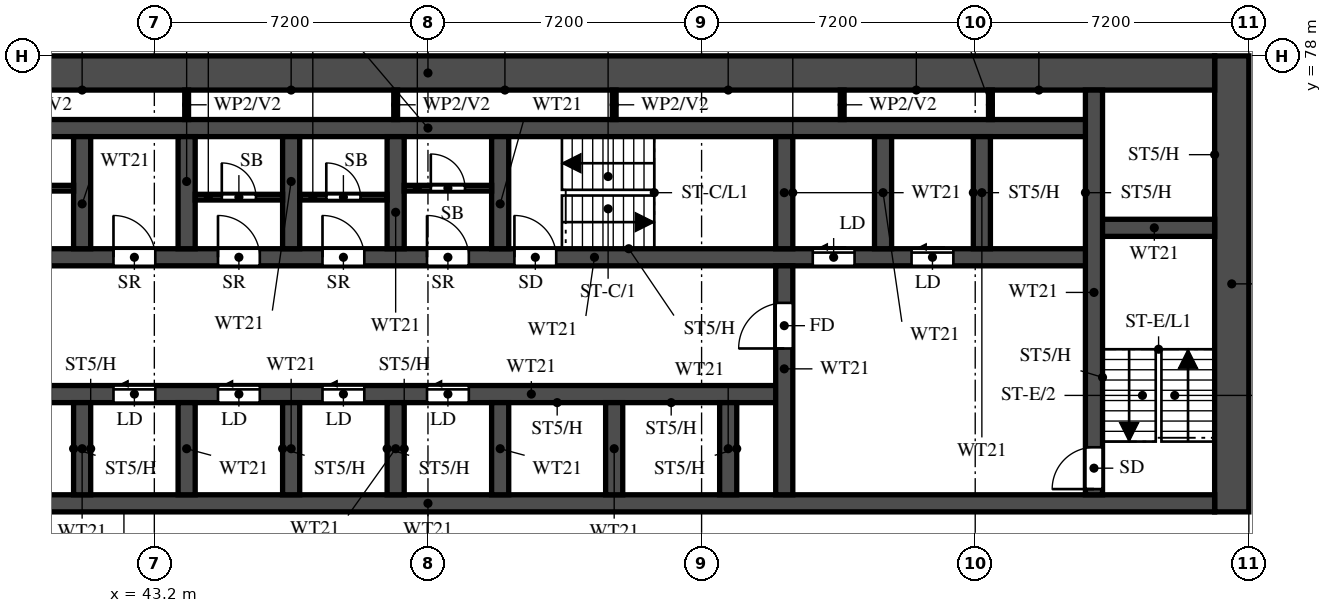
"""IFC4 building model, lengths in metres.
Left out: names, types, materials, properties, quantities, classifications, styles, units other than length and angle.
Written with IfcOpenShell. Run it as: python <this file> out.ifc"""

import sys

from ifc_helpers import new_model, si_unit, direction, frame, frame_2d, origin, place, context, subcontext, project, spatial, rectangle, extrude, element, fill, save


model = new_model("IFC4")
c1 = context("Model", 3, precision=1e-05, world=origin(), true_north=direction((0.0, 1.0)))
c2 = subcontext(c1, "Body", "Model", "MODEL_VIEW")
j1 = project(units=[si_unit("LENGTHUNIT", "METRE"), si_unit("PLANEANGLEUNIT", "RADIAN")], contexts=[c1])
p1 = place(None, origin())
s1 = spatial("IfcSite", under=j1, at=p1, CompositionType="ELEMENT")
p2 = place(p1, origin())
s2 = spatial("IfcBuilding", under=s1, at=p2, CompositionType="ELEMENT")
p3 = place(p2, frame((0.0, 0.0, 27.0)))
s3 = spatial("IfcBuildingStorey", under=s2, at=p3, CompositionType="ELEMENT", Elevation=27.0)
p4 = place(p3, frame((71.55, 66.0, 0.0), z_axis=(0.0, 0.0, 1.0), x_axis=(0.0, 1.0, 0.0)))
e1 = element("IfcWall", 1, at=p4, inside=s3, PredefinedType="SHEAR", context=c2, shape_type="SweptSolid", body=[
    extrude(rectangle(XDim=12.0, YDim=0.9, at=frame_2d((6.0, 0.0))), origin(), (0.0, 0.0, 1.0), 3.18),
])
p5 = place(p3, frame((29.7, 77.55, 0.0), z_axis=(0.0, 0.0, 1.0), x_axis=(1.0, 0.0, 0.0)))
e2 = element("IfcWall", 2, at=p5, inside=s3, PredefinedType="SHEAR", context=c2, shape_type="SweptSolid", body=[
    extrude(rectangle(XDim=41.4, YDim=0.9, at=frame_2d((20.7, 0.0))), origin(), (0.0, 0.0, 1.0), 3.18),
])
p6 = place(p3, frame((29.7, 66.225, 0.0), z_axis=(0.0, 0.0, 1.0), x_axis=(1.0, 0.0, 0.0)))
e3 = element("IfcWall", 3, at=p6, inside=s3, PredefinedType="SHEAR", context=c2, shape_type="SweptSolid", body=[
    extrude(rectangle(XDim=41.4, YDim=0.45, at=frame_2d((20.7, 0.0))), origin(), (0.0, 0.0, 1.0), 3.18),
])
p7 = place(p6, frame((0.925, 0.0, 0.0)))
e4 = element("IfcOpeningElement", 4, at=p7, cuts=e3, PredefinedType="OPENING", context=c2, shape_type="SweptSolid", body=[
    extrude(rectangle(XDim=1.1, YDim=2.1, at=frame_2d((0.55, 1.05))), frame((0.0, 0.235, 0.0), z_axis=(0.0, -1.0, 0.0), x_axis=(1.0, 0.0, 0.0)), (0.0, 0.0, 1.0), 0.47),
])
p8 = place(p6, frame((3.738, 0.0, 0.0)))
e5 = element("IfcOpeningElement", 5, at=p8, cuts=e3, PredefinedType="OPENING", context=c2, shape_type="SweptSolid", body=[
    extrude(rectangle(XDim=1.8, YDim=2.1, at=frame_2d((0.9, 1.05))), frame((0.0, 0.235, 0.0), z_axis=(0.0, -1.0, 0.0), x_axis=(1.0, 0.0, 0.0)), (0.0, 0.0, 1.0), 0.47),
])
p9 = place(p3, frame((35.575, 69.1, 0.0), z_axis=(0.0, 0.0, 1.0), x_axis=(1.0, 0.0, 0.0)))
e6 = element("IfcWall", 6, at=p9, inside=s3, PredefinedType="SHEAR", context=c2, shape_type="SweptSolid", body=[
    extrude(rectangle(XDim=24.2, YDim=0.45, at=frame_2d((12.1, 0.0))), origin(), (0.0, 0.0, 1.0), 3.18),
])
p10 = place(p9, frame((1.05, 0.0, 0.0)))
e7 = element("IfcOpeningElement", 7, at=p10, cuts=e6, PredefinedType="OPENING", context=c2, shape_type="SweptSolid", body=[
    extrude(rectangle(XDim=1.1, YDim=2.1, at=frame_2d((0.55, 1.05))), frame((0.0, 0.235, 0.0), z_axis=(0.0, -1.0, 0.0), x_axis=(1.0, 0.0, 0.0)), (0.0, 0.0, 1.0), 0.47),
])
p11 = place(p9, frame((3.8, 0.0, 0.0)))
e8 = element("IfcOpeningElement", 8, at=p11, cuts=e6, PredefinedType="OPENING", context=c2, shape_type="SweptSolid", body=[
    extrude(rectangle(XDim=1.1, YDim=2.1, at=frame_2d((0.55, 1.05))), frame((0.0, 0.235, 0.0), z_axis=(0.0, -1.0, 0.0), x_axis=(1.0, 0.0, 0.0)), (0.0, 0.0, 1.0), 0.47),
])
p12 = place(p9, frame((6.55, 0.0, 0.0)))
e9 = element("IfcOpeningElement", 9, at=p12, cuts=e6, PredefinedType="OPENING", context=c2, shape_type="SweptSolid", body=[
    extrude(rectangle(XDim=1.1, YDim=2.1, at=frame_2d((0.55, 1.05))), frame((0.0, 0.235, 0.0), z_axis=(0.0, -1.0, 0.0), x_axis=(1.0, 0.0, 0.0)), (0.0, 0.0, 1.0), 0.47),
])
p13 = place(p9, frame((9.3, 0.0, 0.0)))
e10 = element("IfcOpeningElement", 10, at=p13, cuts=e6, PredefinedType="OPENING", context=c2, shape_type="SweptSolid", body=[
    extrude(rectangle(XDim=1.1, YDim=2.1, at=frame_2d((0.55, 1.05))), frame((0.0, 0.235, 0.0), z_axis=(0.0, -1.0, 0.0), x_axis=(1.0, 0.0, 0.0)), (0.0, 0.0, 1.0), 0.47),
])
p14 = place(p9, frame((12.05, 0.0, 0.0)))
e11 = element("IfcOpeningElement", 11, at=p14, cuts=e6, PredefinedType="OPENING", context=c2, shape_type="SweptSolid", body=[
    extrude(rectangle(XDim=1.1, YDim=2.1, at=frame_2d((0.55, 1.05))), frame((0.0, 0.235, 0.0), z_axis=(0.0, -1.0, 0.0), x_axis=(1.0, 0.0, 0.0)), (0.0, 0.0, 1.0), 0.47),
])
p15 = place(p9, frame((14.8, 0.0, 0.0)))
e12 = element("IfcOpeningElement", 12, at=p15, cuts=e6, PredefinedType="OPENING", context=c2, shape_type="SweptSolid", body=[
    extrude(rectangle(XDim=1.1, YDim=2.1, at=frame_2d((0.55, 1.05))), frame((0.0, 0.235, 0.0), z_axis=(0.0, -1.0, 0.0), x_axis=(1.0, 0.0, 0.0)), (0.0, 0.0, 1.0), 0.47),
])
p16 = place(p3, frame((32.875, 72.7, 0.0), z_axis=(0.0, 0.0, 1.0), x_axis=(1.0, 0.0, 0.0)))
e13 = element("IfcWall", 13, at=p16, inside=s3, PredefinedType="SHEAR", context=c2, shape_type="SweptSolid", body=[
    extrude(rectangle(XDim=35.05, YDim=0.45, at=frame_2d((17.525, 0.0))), origin(), (0.0, 0.0, 1.0), 3.18),
])
p17 = place(p16, frame((19.8, 0.0, 0.0)))
e14 = element("IfcOpeningElement", 14, at=p17, cuts=e13, PredefinedType="OPENING", context=c2, shape_type="SweptSolid", body=[
    extrude(rectangle(XDim=1.1, YDim=2.1, at=frame_2d((0.55, 1.05))), frame((0.0, 0.235, 0.0), z_axis=(0.0, -1.0, 0.0), x_axis=(1.0, 0.0, 0.0)), (0.0, 0.0, 1.0), 0.47),
])
p18 = place(p16, frame((27.65, 0.0, 0.0)))
e15 = element("IfcOpeningElement", 15, at=p18, cuts=e13, PredefinedType="OPENING", context=c2, shape_type="SweptSolid", body=[
    extrude(rectangle(XDim=1.1, YDim=2.1, at=frame_2d((0.55, 1.05))), frame((0.0, 0.235, 0.0), z_axis=(0.0, -1.0, 0.0), x_axis=(1.0, 0.0, 0.0)), (0.0, 0.0, 1.0), 0.47),
])
p19 = place(p16, frame((30.25, 0.0, 0.0)))
e16 = element("IfcOpeningElement", 16, at=p19, cuts=e13, PredefinedType="OPENING", context=c2, shape_type="SweptSolid", body=[
    extrude(rectangle(XDim=1.1, YDim=2.1, at=frame_2d((0.55, 1.05))), frame((0.0, 0.235, 0.0), z_axis=(0.0, -1.0, 0.0), x_axis=(1.0, 0.0, 0.0)), (0.0, 0.0, 1.0), 0.47),
])
p20 = place(p16, frame((3.75, 0.0, 0.0)))
e17 = element("IfcOpeningElement", 17, at=p20, cuts=e13, PredefinedType="OPENING", context=c2, shape_type="SweptSolid", body=[
    extrude(rectangle(XDim=1.1, YDim=2.1, at=frame_2d((0.55, 1.05))), frame((0.0, 0.235, 0.0), z_axis=(0.0, -1.0, 0.0), x_axis=(1.0, 0.0, 0.0)), (0.0, 0.0, 1.0), 0.47),
])
p21 = place(p16, frame((6.5, 0.0, 0.0)))
e18 = element("IfcOpeningElement", 18, at=p21, cuts=e13, PredefinedType="OPENING", context=c2, shape_type="SweptSolid", body=[
    extrude(rectangle(XDim=1.1, YDim=2.1, at=frame_2d((0.55, 1.05))), frame((0.0, 0.235, 0.0), z_axis=(0.0, -1.0, 0.0), x_axis=(1.0, 0.0, 0.0)), (0.0, 0.0, 1.0), 0.47),
])
p22 = place(p16, frame((9.25, 0.0, 0.0)))
e19 = element("IfcOpeningElement", 19, at=p22, cuts=e13, PredefinedType="OPENING", context=c2, shape_type="SweptSolid", body=[
    extrude(rectangle(XDim=1.1, YDim=2.1, at=frame_2d((0.55, 1.05))), frame((0.0, 0.235, 0.0), z_axis=(0.0, -1.0, 0.0), x_axis=(1.0, 0.0, 0.0)), (0.0, 0.0, 1.0), 0.47),
])
p23 = place(p16, frame((12.0, 0.0, 0.0)))
e20 = element("IfcOpeningElement", 20, at=p23, cuts=e13, PredefinedType="OPENING", context=c2, shape_type="SweptSolid", body=[
    extrude(rectangle(XDim=1.1, YDim=2.1, at=frame_2d((0.55, 1.05))), frame((0.0, 0.235, 0.0), z_axis=(0.0, -1.0, 0.0), x_axis=(1.0, 0.0, 0.0)), (0.0, 0.0, 1.0), 0.47),
])
p24 = place(p16, frame((14.75, 0.0, 0.0)))
e21 = element("IfcOpeningElement", 21, at=p24, cuts=e13, PredefinedType="OPENING", context=c2, shape_type="SweptSolid", body=[
    extrude(rectangle(XDim=1.1, YDim=2.1, at=frame_2d((0.55, 1.05))), frame((0.0, 0.235, 0.0), z_axis=(0.0, -1.0, 0.0), x_axis=(1.0, 0.0, 0.0)), (0.0, 0.0, 1.0), 0.47),
])
p25 = place(p16, frame((17.5, 0.0, 0.0)))
e22 = element("IfcOpeningElement", 22, at=p25, cuts=e13, PredefinedType="OPENING", context=c2, shape_type="SweptSolid", body=[
    extrude(rectangle(XDim=1.1, YDim=2.1, at=frame_2d((0.55, 1.05))), frame((0.0, 0.235, 0.0), z_axis=(0.0, -1.0, 0.0), x_axis=(1.0, 0.0, 0.0)), (0.0, 0.0, 1.0), 0.47),
])
p26 = place(p16, frame((0.913, 0.0, 0.0)))
e23 = element("IfcOpeningElement", 23, at=p26, cuts=e13, PredefinedType="OPENING", context=c2, shape_type="SweptSolid", body=[
    extrude(rectangle(XDim=1.1, YDim=2.1, at=frame_2d((0.55, 1.05))), frame((0.0, 0.235, 0.0), z_axis=(0.0, -1.0, 0.0), x_axis=(1.0, 0.0, 0.0)), (0.0, 0.0, 1.0), 0.47),
])
p27 = place(p3, frame((32.875, 76.1, 0.0), z_axis=(0.0, 0.0, 1.0), x_axis=(1.0, 0.0, 0.0)))
e24 = element("IfcWall", 24, at=p27, inside=s3, PredefinedType="SHEAR", context=c2, shape_type="SweptSolid", body=[
    extrude(rectangle(XDim=35.05, YDim=0.45, at=frame_2d((17.525, 0.0))), origin(), (0.0, 0.0, 1.0), 3.18),
])
p28 = place(p3, frame((67.925, 73.475, 0.0), z_axis=(0.0, 0.0, 1.0), x_axis=(1.0, 0.0, 0.0)))
e25 = element("IfcWall", 25, at=p28, inside=s3, PredefinedType="SHEAR", context=c2, shape_type="SweptSolid", body=[
    extrude(rectangle(XDim=3.175, YDim=0.45, at=frame_2d((1.587, 0.0))), origin(), (0.0, 0.0, 1.0), 3.18),
])
p29 = place(p3, frame((67.925, 66.45, 0.0), z_axis=(0.0, 0.0, 1.0), x_axis=(0.0, 1.0, 0.0)))
e26 = element("IfcWall", 26, at=p29, inside=s3, PredefinedType="SHEAR", context=c2, shape_type="SweptSolid", body=[
    extrude(rectangle(XDim=10.65, YDim=0.45, at=frame_2d((5.325, 0.0))), origin(), (0.0, 0.0, 1.0), 3.18),
])
p30 = place(p29, frame((0.15, 0.0, 0.0)))
e27 = element("IfcOpeningElement", 27, at=p30, cuts=e26, PredefinedType="OPENING", context=c2, shape_type="SweptSolid", body=[
    extrude(rectangle(XDim=1.1, YDim=2.1, at=frame_2d((0.55, 1.05))), frame((0.0, 0.235, 0.0), z_axis=(0.0, -1.0, 0.0), x_axis=(1.0, 0.0, 0.0)), (0.0, 0.0, 1.0), 0.47),
])
p31 = place(p3, frame((59.775, 66.45, 0.0), z_axis=(0.0, 0.0, 1.0), x_axis=(0.0, 1.0, 0.0)))
e28 = element("IfcWall", 28, at=p31, inside=s3, PredefinedType="SHEAR", context=c2, shape_type="SweptSolid", body=[
    extrude(rectangle(XDim=6.025, YDim=0.45, at=frame_2d((3.013, 0.0))), origin(), (0.0, 0.0, 1.0), 3.18),
])
p32 = place(p31, frame((3.85, 0.0, 0.0)))
e29 = element("IfcOpeningElement", 29, at=p32, cuts=e28, PredefinedType="OPENING", context=c2, shape_type="SweptSolid", body=[
    extrude(rectangle(XDim=1.2, YDim=2.1, at=frame_2d((0.6, 1.05))), frame((0.0, 0.235, 0.0), z_axis=(0.0, -1.0, 0.0), x_axis=(1.0, 0.0, 0.0)), (0.0, 0.0, 1.0), 0.47),
])
p33 = place(p3, frame((59.775, 72.925, 0.0), z_axis=(0.0, 0.0, 1.0), x_axis=(0.0, 1.0, 0.0)))
e30 = element("IfcWall", 30, at=p33, inside=s3, PredefinedType="SHEAR", context=c2, shape_type="SweptSolid", body=[
    extrude(rectangle(XDim=2.95, YDim=0.45, at=frame_2d((1.475, 0.0))), origin(), (0.0, 0.0, 1.0), 3.18),
])
for number, where, z_axis, x_axis in (
    (31, (41.3, 66.45, 0.0), (0.0, 0.0, 1.0), (0.0, 1.0, 0.0)),
    (32, (44.05, 66.45, 0.0), (0.0, 0.0, 1.0), (0.0, 1.0, 0.0)),
    (33, (46.8, 66.45, 0.0), (0.0, 0.0, 1.0), (0.0, 1.0, 0.0)),
    (34, (49.55, 66.45, 0.0), (0.0, 0.0, 1.0), (0.0, 1.0, 0.0)),
    (35, (52.3, 66.45, 0.0), (0.0, 0.0, 1.0), (0.0, 1.0, 0.0)),
    (36, (55.3, 66.45, 0.0), (0.0, 0.0, 1.0), (0.0, 1.0, 0.0)),
    (37, (58.3, 66.45, 0.0), (0.0, 0.0, 1.0), (0.0, 1.0, 0.0)),
):
    element("IfcWall", number, at=place(p3, frame(where, z_axis=z_axis, x_axis=x_axis)), inside=s3, PredefinedType="SHEAR", context=c2, shape_type="SweptSolid", body=[
        extrude(rectangle(XDim=2.425, YDim=0.45, at=frame_2d((1.212, 0.0))), origin(), (0.0, 0.0, 1.0), 3.18),
    ])
for number, where, z_axis, x_axis in (
    (38, (41.3, 72.925, 0.0), (0.0, 0.0, 1.0), (0.0, 1.0, 0.0)),
    (39, (44.05, 72.925, 0.0), (0.0, 0.0, 1.0), (0.0, 1.0, 0.0)),
    (40, (46.8, 72.925, 0.0), (0.0, 0.0, 1.0), (0.0, 1.0, 0.0)),
    (41, (49.55, 72.925, 0.0), (0.0, 0.0, 1.0), (0.0, 1.0, 0.0)),
    (42, (52.3, 72.925, 0.0), (0.0, 0.0, 1.0), (0.0, 1.0, 0.0)),
    (43, (62.375, 72.925, 0.0), (0.0, 0.0, 1.0), (0.0, 1.0, 0.0)),
    (44, (64.975, 72.925, 0.0), (0.0, 0.0, 1.0), (0.0, 1.0, 0.0)),
):
    element("IfcWall", number, at=place(p3, frame(where, z_axis=z_axis, x_axis=x_axis)), inside=s3, PredefinedType="SHEAR", context=c2, shape_type="SweptSolid", body=[
        extrude(rectangle(XDim=2.95, YDim=0.45, at=frame_2d((1.475, 0.0))), origin(), (0.0, 0.0, 1.0), 3.18),
    ])
p34 = place(p3, frame((38.775, 74.518, 0.0), z_axis=(0.0, 0.0, 1.0), x_axis=(1.0, 0.0, 0.0)))
e45 = element("IfcWall", 45, at=p34, inside=s3, PredefinedType="PARTITIONING", context=c2, shape_type="SweptSolid", body=[
    extrude(rectangle(XDim=2.3, YDim=0.15, at=frame_2d((1.15, 0.0))), origin(), (0.0, 0.0, 1.0), 3.18),
])
p35 = place(p34, frame((0.7, 0.0, 0.0)))
e46 = element("IfcOpeningElement", 46, at=p35, cuts=e45, PredefinedType="OPENING", context=c2, shape_type="SweptSolid", body=[
    extrude(rectangle(XDim=0.9, YDim=2.1, at=frame_2d((0.45, 1.05))), frame((0.0, 0.085, 0.0), z_axis=(0.0, -1.0, 0.0), x_axis=(1.0, 0.0, 0.0)), (0.0, 0.0, 1.0), 0.17),
])
p36 = place(p3, frame((44.275, 74.282, 0.0), z_axis=(0.0, 0.0, 1.0), x_axis=(1.0, 0.0, 0.0)))
e47 = element("IfcWall", 47, at=p36, inside=s3, PredefinedType="PARTITIONING", context=c2, shape_type="SweptSolid", body=[
    extrude(rectangle(XDim=2.3, YDim=0.15, at=frame_2d((1.15, 0.0))), origin(), (0.0, 0.0, 1.0), 3.18),
])
p37 = place(p36, frame((0.7, 0.0, 0.0)))
e48 = element("IfcOpeningElement", 48, at=p37, cuts=e47, PredefinedType="OPENING", context=c2, shape_type="SweptSolid", body=[
    extrude(rectangle(XDim=0.9, YDim=2.1, at=frame_2d((0.45, 1.05))), frame((0.0, 0.085, 0.0), z_axis=(0.0, -1.0, 0.0), x_axis=(1.0, 0.0, 0.0)), (0.0, 0.0, 1.0), 0.17),
])
p38 = place(p3, frame((47.025, 74.282, 0.0), z_axis=(0.0, 0.0, 1.0), x_axis=(1.0, 0.0, 0.0)))
e49 = element("IfcWall", 49, at=p38, inside=s3, PredefinedType="PARTITIONING", context=c2, shape_type="SweptSolid", body=[
    extrude(rectangle(XDim=2.3, YDim=0.15, at=frame_2d((1.15, 0.0))), origin(), (0.0, 0.0, 1.0), 3.18),
])
p39 = place(p38, frame((0.7, 0.0, 0.0)))
e50 = element("IfcOpeningElement", 50, at=p39, cuts=e49, PredefinedType="OPENING", context=c2, shape_type="SweptSolid", body=[
    extrude(rectangle(XDim=0.9, YDim=2.1, at=frame_2d((0.45, 1.05))), frame((0.0, 0.085, 0.0), z_axis=(0.0, -1.0, 0.0), x_axis=(1.0, 0.0, 0.0)), (0.0, 0.0, 1.0), 0.17),
])
p40 = place(p3, frame((49.775, 74.518, 0.0), z_axis=(0.0, 0.0, 1.0), x_axis=(1.0, 0.0, 0.0)))
e51 = element("IfcWall", 51, at=p40, inside=s3, PredefinedType="PARTITIONING", context=c2, shape_type="SweptSolid", body=[
    extrude(rectangle(XDim=2.3, YDim=0.15, at=frame_2d((1.15, 0.0))), origin(), (0.0, 0.0, 1.0), 3.18),
])
p41 = place(p40, frame((0.7, 0.0, 0.0)))
e52 = element("IfcOpeningElement", 52, at=p41, cuts=e51, PredefinedType="OPENING", context=c2, shape_type="SweptSolid", body=[
    extrude(rectangle(XDim=0.9, YDim=2.1, at=frame_2d((0.45, 1.05))), frame((0.0, 0.085, 0.0), z_axis=(0.0, -1.0, 0.0), x_axis=(1.0, 0.0, 0.0)), (0.0, 0.0, 1.0), 0.17),
])
for number, where, z_axis, x_axis in (
    (53, (44.05, 76.325, 0.0), (0.0, 0.0, 1.0), (0.0, 1.0, 0.0)),
    (54, (49.55, 76.325, 0.0), (0.0, 0.0, 1.0), (0.0, 1.0, 0.0)),
    (55, (55.3, 76.325, 0.0), (0.0, 0.0, 1.0), (0.0, 1.0, 0.0)),
    (56, (61.3, 76.325, 0.0), (0.0, 0.0, 1.0), (0.0, 1.0, 0.0)),
    (57, (65.2, 76.325, 0.0), (0.0, 0.0, 1.0), (0.0, 1.0, 0.0)),
):
    element("IfcWall", number, at=place(p3, frame(where, z_axis=z_axis, x_axis=x_axis)), inside=s3, PredefinedType="PARTITIONING", context=c2, shape_type="SweptSolid", body=[
        extrude(rectangle(XDim=0.775, YDim=0.1, at=frame_2d((0.388, 0.0))), origin(), (0.0, 0.0, 1.0), 3.18),
    ])
p42 = place(p17, origin())
e58 = element("IfcDoor", 58, at=p42, inside=s3, OperationType="SINGLE_SWING_LEFT", PredefinedType="DOOR", context=c2, shape_type="SweptSolid", body=[
    extrude(rectangle(XDim=1.1, YDim=2.1, at=frame_2d((0.55, 1.05))), frame((0.0, 0.025, 0.0), z_axis=(0.0, -1.0, 0.0), x_axis=(1.0, 0.0, 0.0)), (0.0, 0.0, 1.0), 0.05),
])
fill(e14, e58)
p43 = place(p30, origin())
e59 = element("IfcDoor", 59, at=p43, inside=s3, OperationType="SINGLE_SWING_LEFT", PredefinedType="DOOR", context=c2, shape_type="SweptSolid", body=[
    extrude(rectangle(XDim=1.1, YDim=2.1, at=frame_2d((0.55, 1.05))), frame((0.0, 0.025, 0.0), z_axis=(0.0, -1.0, 0.0), x_axis=(1.0, 0.0, 0.0)), (0.0, 0.0, 1.0), 0.05),
])
fill(e27, e59)
p44 = place(p32, origin())
e60 = element("IfcDoor", 60, at=p44, inside=s3, OperationType="SINGLE_SWING_RIGHT", PredefinedType="DOOR", context=c2, shape_type="SweptSolid", body=[
    extrude(rectangle(XDim=1.2, YDim=2.1, at=frame_2d((0.6, 1.05))), frame((0.0, 0.025, 0.0), z_axis=(0.0, -1.0, 0.0), x_axis=(1.0, 0.0, 0.0)), (0.0, 0.0, 1.0), 0.05),
])
fill(e29, e60)
p45 = place(p18, origin())
e61 = element("IfcDoor", 61, at=p45, inside=s3, OperationType="SLIDING_TO_LEFT", PredefinedType="DOOR", context=c2, shape_type="SweptSolid", body=[
    extrude(rectangle(XDim=1.1, YDim=2.1, at=frame_2d((0.55, 1.05))), frame((0.0, 0.025, 0.0), z_axis=(0.0, -1.0, 0.0), x_axis=(1.0, 0.0, 0.0)), (0.0, 0.0, 1.0), 0.05),
])
fill(e15, e61)
p46 = place(p19, origin())
e62 = element("IfcDoor", 62, at=p46, inside=s3, OperationType="SLIDING_TO_LEFT", PredefinedType="DOOR", context=c2, shape_type="SweptSolid", body=[
    extrude(rectangle(XDim=1.1, YDim=2.1, at=frame_2d((0.55, 1.05))), frame((0.0, 0.025, 0.0), z_axis=(0.0, -1.0, 0.0), x_axis=(1.0, 0.0, 0.0)), (0.0, 0.0, 1.0), 0.05),
])
fill(e16, e62)
p47 = place(p12, origin())
e63 = element("IfcDoor", 63, at=p47, inside=s3, OperationType="SLIDING_TO_LEFT", PredefinedType="DOOR", context=c2, shape_type="SweptSolid", body=[
    extrude(rectangle(XDim=1.1, YDim=2.1, at=frame_2d((0.55, 1.05))), frame((0.0, 0.025, 0.0), z_axis=(0.0, -1.0, 0.0), x_axis=(1.0, 0.0, 0.0)), (0.0, 0.0, 1.0), 0.05),
])
fill(e9, e63)
p48 = place(p13, origin())
e64 = element("IfcDoor", 64, at=p48, inside=s3, OperationType="SLIDING_TO_LEFT", PredefinedType="DOOR", context=c2, shape_type="SweptSolid", body=[
    extrude(rectangle(XDim=1.1, YDim=2.1, at=frame_2d((0.55, 1.05))), frame((0.0, 0.025, 0.0), z_axis=(0.0, -1.0, 0.0), x_axis=(1.0, 0.0, 0.0)), (0.0, 0.0, 1.0), 0.05),
])
fill(e10, e64)
p49 = place(p14, origin())
e65 = element("IfcDoor", 65, at=p49, inside=s3, OperationType="SLIDING_TO_LEFT", PredefinedType="DOOR", context=c2, shape_type="SweptSolid", body=[
    extrude(rectangle(XDim=1.1, YDim=2.1, at=frame_2d((0.55, 1.05))), frame((0.0, 0.025, 0.0), z_axis=(0.0, -1.0, 0.0), x_axis=(1.0, 0.0, 0.0)), (0.0, 0.0, 1.0), 0.05),
])
fill(e11, e65)
p50 = place(p15, origin())
e66 = element("IfcDoor", 66, at=p50, inside=s3, OperationType="SLIDING_TO_LEFT", PredefinedType="DOOR", context=c2, shape_type="SweptSolid", body=[
    extrude(rectangle(XDim=1.1, YDim=2.1, at=frame_2d((0.55, 1.05))), frame((0.0, 0.025, 0.0), z_axis=(0.0, -1.0, 0.0), x_axis=(1.0, 0.0, 0.0)), (0.0, 0.0, 1.0), 0.05),
])
fill(e12, e66)
p51 = place(p22, origin())
e67 = element("IfcDoor", 67, at=p51, inside=s3, OperationType="SINGLE_SWING_LEFT", PredefinedType="DOOR", context=c2, shape_type="SweptSolid", body=[
    extrude(rectangle(XDim=1.1, YDim=2.1, at=frame_2d((0.55, 1.05))), frame((0.0, 0.025, 0.0), z_axis=(0.0, -1.0, 0.0), x_axis=(1.0, 0.0, 0.0)), (0.0, 0.0, 1.0), 0.05),
])
fill(e19, e67)
p52 = place(p23, origin())
e68 = element("IfcDoor", 68, at=p52, inside=s3, OperationType="SINGLE_SWING_LEFT", PredefinedType="DOOR", context=c2, shape_type="SweptSolid", body=[
    extrude(rectangle(XDim=1.1, YDim=2.1, at=frame_2d((0.55, 1.05))), frame((0.0, 0.025, 0.0), z_axis=(0.0, -1.0, 0.0), x_axis=(1.0, 0.0, 0.0)), (0.0, 0.0, 1.0), 0.05),
])
fill(e20, e68)
p53 = place(p37, origin())
e69 = element("IfcDoor", 69, at=p53, inside=s3, OperationType="SINGLE_SWING_RIGHT", PredefinedType="DOOR", context=c2, shape_type="SweptSolid", body=[
    extrude(rectangle(XDim=0.9, YDim=2.1, at=frame_2d((0.45, 1.05))), frame((0.0, 0.025, 0.0), z_axis=(0.0, -1.0, 0.0), x_axis=(1.0, 0.0, 0.0)), (0.0, 0.0, 1.0), 0.05),
])
fill(e48, e69)
p54 = place(p24, origin())
e70 = element("IfcDoor", 70, at=p54, inside=s3, OperationType="SINGLE_SWING_LEFT", PredefinedType="DOOR", context=c2, shape_type="SweptSolid", body=[
    extrude(rectangle(XDim=1.1, YDim=2.1, at=frame_2d((0.55, 1.05))), frame((0.0, 0.025, 0.0), z_axis=(0.0, -1.0, 0.0), x_axis=(1.0, 0.0, 0.0)), (0.0, 0.0, 1.0), 0.05),
])
fill(e21, e70)
p55 = place(p39, origin())
e71 = element("IfcDoor", 71, at=p55, inside=s3, OperationType="SINGLE_SWING_LEFT", PredefinedType="DOOR", context=c2, shape_type="SweptSolid", body=[
    extrude(rectangle(XDim=0.9, YDim=2.1, at=frame_2d((0.45, 1.05))), frame((0.0, 0.025, 0.0), z_axis=(0.0, -1.0, 0.0), x_axis=(1.0, 0.0, 0.0)), (0.0, 0.0, 1.0), 0.05),
])
fill(e50, e71)
p56 = place(p25, origin())
e72 = element("IfcDoor", 72, at=p56, inside=s3, OperationType="SINGLE_SWING_LEFT", PredefinedType="DOOR", context=c2, shape_type="SweptSolid", body=[
    extrude(rectangle(XDim=1.1, YDim=2.1, at=frame_2d((0.55, 1.05))), frame((0.0, 0.025, 0.0), z_axis=(0.0, -1.0, 0.0), x_axis=(1.0, 0.0, 0.0)), (0.0, 0.0, 1.0), 0.05),
])
fill(e22, e72)
p57 = place(p41, origin())
e73 = element("IfcDoor", 73, at=p57, inside=s3, OperationType="SINGLE_SWING_LEFT", PredefinedType="DOOR", context=c2, shape_type="SweptSolid", body=[
    extrude(rectangle(XDim=0.9, YDim=2.1, at=frame_2d((0.45, 1.05))), frame((0.0, 0.025, 0.0), z_axis=(0.0, -1.0, 0.0), x_axis=(1.0, 0.0, 0.0)), (0.0, 0.0, 1.0), 0.05),
])
fill(e52, e73)
save(model, sys.argv[1])
